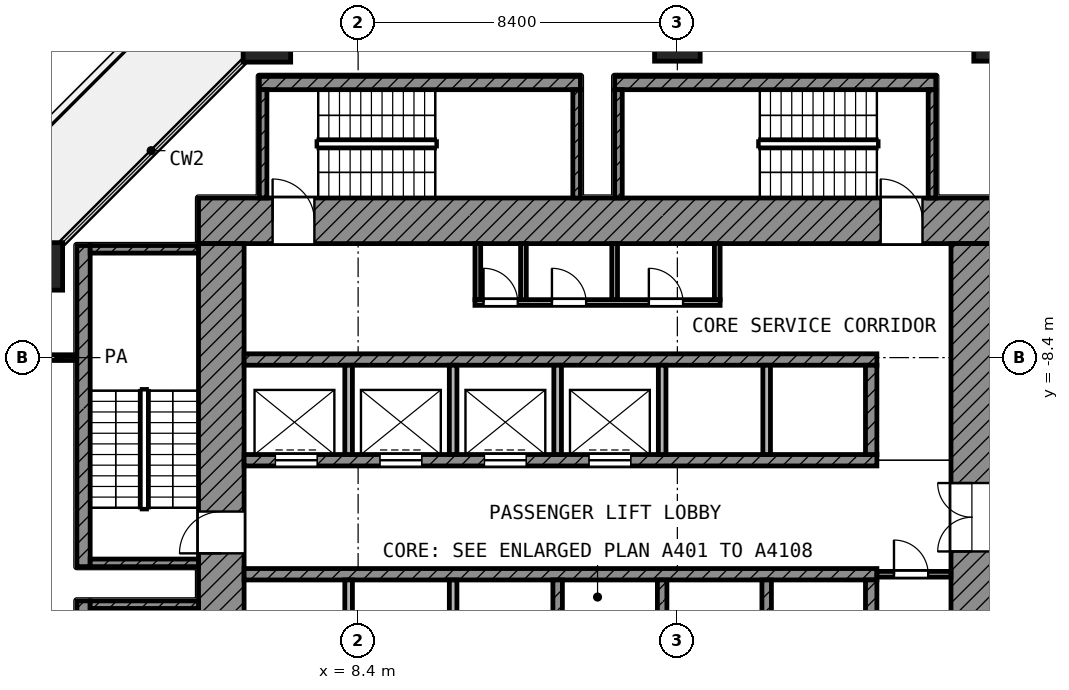
"""IFC4 building model, lengths in metres.
Left out: names, types, materials, properties, quantities, classifications, styles, units other than length and angle.
Written with IfcOpenShell. Run it as: python <this file> out.ifc"""

import sys

from ifc_helpers import new_model, si_unit, direction, frame, frame_2d, origin, origin_2d, place, context, subcontext, project, spatial, rectangle, extrude, element, fill, save


model = new_model("IFC4")
c1 = context("Model", 3, precision=1e-05, world=origin(), true_north=direction((0.0, 1.0)))
c2 = subcontext(c1, "Body", "Model", "MODEL_VIEW")
j1 = project(units=[si_unit("LENGTHUNIT", "METRE"), si_unit("PLANEANGLEUNIT", "RADIAN")], contexts=[c1])
p1 = place(None, origin())
s1 = spatial("IfcSite", under=j1, at=p1, CompositionType="ELEMENT")
p2 = place(p1, origin())
s2 = spatial("IfcBuilding", under=s1, at=p2, CompositionType="ELEMENT")
p3 = place(p2, frame((0.0, 0.0, 51.8)))
s3 = spatial("IfcBuildingStorey", under=s2, at=p3, CompositionType="ELEMENT", Elevation=51.8)
p4 = place(p3, frame((6.0, 0.0, 0.0), z_axis=(0.0, 0.0, 1.0), x_axis=(1.0, 0.0, 0.0)))
e1 = element("IfcColumn", 1, at=p4, inside=s3, PredefinedType="COLUMN", context=c2, shape_type="SweptSolid", body=[
    extrude(rectangle(XDim=1.25, YDim=1.25, at=origin_2d()), origin(), (0.0, 0.0, 1.0), 4.2),
])
for number, where, z_axis, x_axis in (
    (2, (16.8, 0.0, 0.0), (0.0, 0.0, 1.0), (1.0, 0.0, 0.0)),
    (3, (25.2, 0.0, 0.0), (0.0, 0.0, 1.0), (1.0, 0.0, 0.0)),
):
    element("IfcColumn", number, at=place(p3, frame(where, z_axis=z_axis, x_axis=x_axis)), inside=s3, PredefinedType="COLUMN", context=c2, shape_type="SweptSolid", body=[
        extrude(rectangle(XDim=1.2, YDim=1.2, at=origin_2d()), origin(), (0.0, 0.0, 1.0), 4.2),
    ])
p5 = place(p3, frame((0.0, -6.0, 0.0), z_axis=(0.0, 0.0, 1.0), x_axis=(1.0, 0.0, 0.0)))
e4 = element("IfcColumn", 4, at=p5, inside=s3, PredefinedType="COLUMN", context=c2, shape_type="SweptSolid", body=[
    extrude(rectangle(XDim=1.25, YDim=1.25, at=origin_2d()), origin(), (0.0, 0.0, 1.0), 4.2),
])
p6 = place(p3, frame((4.2, -4.8, 0.0), z_axis=(0.0, 0.0, 1.0), x_axis=(1.0, 0.0, 0.0)))
e5 = element("IfcWall", 5, at=p6, inside=s3, PredefinedType="SHEAR", context=c2, shape_type="SweptSolid", body=[
    extrude(rectangle(XDim=20.9, YDim=1.2, at=frame_2d((10.45, 0.0))), origin(), (0.0, 0.0, 1.0), 3.9),
])
p7 = place(p6, frame((1.95, 0.0, 0.0)))
e6 = element("IfcOpeningElement", 6, at=p7, cuts=e5, PredefinedType="OPENING", context=c2, shape_type="SweptSolid", body=[
    extrude(rectangle(XDim=1.1, YDim=2.1, at=frame_2d((0.55, 1.05))), frame((0.0, 0.61, 0.0), z_axis=(0.0, -1.0, 0.0), x_axis=(1.0, 0.0, 0.0)), (0.0, 0.0, 1.0), 1.22),
])
p8 = place(p6, frame((17.95, 0.0, 0.0)))
e7 = element("IfcOpeningElement", 7, at=p8, cuts=e5, PredefinedType="OPENING", context=c2, shape_type="SweptSolid", body=[
    extrude(rectangle(XDim=1.1, YDim=2.1, at=frame_2d((0.55, 1.05))), frame((0.0, 0.61, 0.0), z_axis=(0.0, -1.0, 0.0), x_axis=(1.0, 0.0, 0.0)), (0.0, 0.0, 1.0), 1.22),
])
p9 = place(p3, frame((4.8, -25.1, 0.0), z_axis=(0.0, 0.0, 1.0), x_axis=(0.0, 1.0, 0.0)))
e8 = element("IfcWall", 8, at=p9, inside=s3, PredefinedType="SHEAR", context=c2, shape_type="SweptSolid", body=[
    extrude(rectangle(XDim=19.7, YDim=1.2, at=frame_2d((9.85, 0.0))), origin(), (0.0, 0.0, 1.0), 3.9),
])
p10 = place(p9, frame((11.55, 0.0, 0.0)))
e9 = element("IfcOpeningElement", 9, at=p10, cuts=e8, PredefinedType="OPENING", context=c2, shape_type="SweptSolid", body=[
    extrude(rectangle(XDim=1.1, YDim=2.1, at=frame_2d((0.55, 1.05))), frame((0.0, 0.61, 0.0), z_axis=(0.0, -1.0, 0.0), x_axis=(1.0, 0.0, 0.0)), (0.0, 0.0, 1.0), 1.22),
])
p11 = place(p9, frame((2.25, 0.0, 0.0)))
e10 = element("IfcOpeningElement", 10, at=p11, cuts=e8, PredefinedType="OPENING", context=c2, shape_type="SweptSolid", body=[
    extrude(rectangle(XDim=1.1, YDim=2.1, at=frame_2d((0.55, 1.05))), frame((0.0, 0.61, 0.0), z_axis=(0.0, -1.0, 0.0), x_axis=(1.0, 0.0, 0.0)), (0.0, 0.0, 1.0), 1.22),
])
p12 = place(p3, frame((24.55, -24.0, 0.0), z_axis=(0.0, 0.0, 1.0), x_axis=(0.0, 1.0, 0.0)))
e11 = element("IfcWall", 11, at=p12, inside=s3, PredefinedType="SHEAR", context=c2, shape_type="SweptSolid", body=[
    extrude(rectangle(XDim=18.6, YDim=1.1, at=frame_2d((9.3, 0.0))), origin(), (0.0, 0.0, 1.0), 3.9),
])
p13 = place(p12, frame((10.5, 0.0, 0.0)))
e12 = element("IfcOpeningElement", 12, at=p13, cuts=e11, PredefinedType="OPENING", context=c2, shape_type="SweptSolid", body=[
    extrude(rectangle(XDim=1.8, YDim=2.1, at=frame_2d((0.9, 1.05))), frame((0.0, 0.56, 0.0), z_axis=(0.0, -1.0, 0.0), x_axis=(1.0, 0.0, 0.0)), (0.0, 0.0, 1.0), 1.12),
])
p14 = place(p3, frame((5.4, -8.45, 0.0), z_axis=(0.0, 0.0, 1.0), x_axis=(1.0, 0.0, 0.0)))
e13 = element("IfcWall", 13, at=p14, inside=s3, PredefinedType="SHEAR", context=c2, shape_type="SweptSolid", body=[
    extrude(rectangle(XDim=16.65, YDim=0.3, at=frame_2d((8.325, 0.0))), origin(), (0.0, 0.0, 1.0), 3.9),
])
p15 = place(p3, frame((5.4, -11.1, 0.0), z_axis=(0.0, 0.0, 1.0), x_axis=(1.0, 0.0, 0.0)))
e14 = element("IfcWall", 14, at=p15, inside=s3, PredefinedType="SHEAR", context=c2, shape_type="SweptSolid", body=[
    extrude(rectangle(XDim=16.65, YDim=0.3, at=frame_2d((8.325, 0.0))), origin(), (0.0, 0.0, 1.0), 3.9),
])
p16 = place(p15, frame((0.825, 0.0, 0.0)))
e15 = element("IfcOpeningElement", 15, at=p16, cuts=e14, PredefinedType="OPENING", context=c2, shape_type="SweptSolid", body=[
    extrude(rectangle(XDim=1.1, YDim=2.1, at=frame_2d((0.55, 1.05))), frame((0.0, 0.16, 0.0), z_axis=(0.0, -1.0, 0.0), x_axis=(1.0, 0.0, 0.0)), (0.0, 0.0, 1.0), 0.32),
])
p17 = place(p15, frame((3.575, 0.0, 0.0)))
e16 = element("IfcOpeningElement", 16, at=p17, cuts=e14, PredefinedType="OPENING", context=c2, shape_type="SweptSolid", body=[
    extrude(rectangle(XDim=1.1, YDim=2.1, at=frame_2d((0.55, 1.05))), frame((0.0, 0.16, 0.0), z_axis=(0.0, -1.0, 0.0), x_axis=(1.0, 0.0, 0.0)), (0.0, 0.0, 1.0), 0.32),
])
p18 = place(p15, frame((6.325, 0.0, 0.0)))
e17 = element("IfcOpeningElement", 17, at=p18, cuts=e14, PredefinedType="OPENING", context=c2, shape_type="SweptSolid", body=[
    extrude(rectangle(XDim=1.1, YDim=2.1, at=frame_2d((0.55, 1.05))), frame((0.0, 0.16, 0.0), z_axis=(0.0, -1.0, 0.0), x_axis=(1.0, 0.0, 0.0)), (0.0, 0.0, 1.0), 0.32),
])
p19 = place(p15, frame((9.075, 0.0, 0.0)))
e18 = element("IfcOpeningElement", 18, at=p19, cuts=e14, PredefinedType="OPENING", context=c2, shape_type="SweptSolid", body=[
    extrude(rectangle(XDim=1.1, YDim=2.1, at=frame_2d((0.55, 1.05))), frame((0.0, 0.16, 0.0), z_axis=(0.0, -1.0, 0.0), x_axis=(1.0, 0.0, 0.0)), (0.0, 0.0, 1.0), 0.32),
])
p20 = place(p3, frame((5.4, -14.1, 0.0), z_axis=(0.0, 0.0, 1.0), x_axis=(1.0, 0.0, 0.0)))
e19 = element("IfcWall", 19, at=p20, inside=s3, PredefinedType="SHEAR", context=c2, shape_type="SweptSolid", body=[
    extrude(rectangle(XDim=16.65, YDim=0.3, at=frame_2d((8.325, 0.0))), origin(), (0.0, 0.0, 1.0), 3.9),
])
p21 = place(p3, frame((21.9, -10.95, 0.0), z_axis=(0.0, 0.0, 1.0), x_axis=(0.0, 1.0, 0.0)))
e20 = element("IfcWall", 20, at=p21, inside=s3, PredefinedType="SHEAR", context=c2, shape_type="SweptSolid", body=[
    extrude(rectangle(XDim=2.35, YDim=0.3, at=frame_2d((1.175, 0.0))), origin(), (0.0, 0.0, 1.0), 3.9),
])
p22 = place(p3, frame((21.9, -16.6, 0.0), z_axis=(0.0, 0.0, 1.0), x_axis=(0.0, 1.0, 0.0)))
e21 = element("IfcWall", 21, at=p22, inside=s3, PredefinedType="SHEAR", context=c2, shape_type="SweptSolid", body=[
    extrude(rectangle(XDim=2.35, YDim=0.3, at=frame_2d((1.175, 0.0))), origin(), (0.0, 0.0, 1.0), 3.9),
])
for number, where, z_axis, x_axis in (
    (22, (8.15, -10.95, 0.0), (0.0, 0.0, 1.0), (0.0, 1.0, 0.0)),
    (23, (10.9, -10.95, 0.0), (0.0, 0.0, 1.0), (0.0, 1.0, 0.0)),
    (24, (13.65, -10.95, 0.0), (0.0, 0.0, 1.0), (0.0, 1.0, 0.0)),
    (25, (16.4, -10.95, 0.0), (0.0, 0.0, 1.0), (0.0, 1.0, 0.0)),
    (26, (19.15, -10.95, 0.0), (0.0, 0.0, 1.0), (0.0, 1.0, 0.0)),
):
    element("IfcWall", number, at=place(p3, frame(where, z_axis=z_axis, x_axis=x_axis)), inside=s3, PredefinedType="PARTITIONING", context=c2, shape_type="SweptSolid", body=[
        extrude(rectangle(XDim=2.35, YDim=0.2, at=frame_2d((1.175, 0.0))), origin(), (0.0, 0.0, 1.0), 3.9),
    ])
for number, where, z_axis, x_axis in (
    (27, (8.15, -16.6, 0.0), (0.0, 0.0, 1.0), (0.0, 1.0, 0.0)),
    (28, (10.9, -16.6, 0.0), (0.0, 0.0, 1.0), (0.0, 1.0, 0.0)),
):
    element("IfcWall", number, at=place(p3, frame(where, z_axis=z_axis, x_axis=x_axis)), inside=s3, PredefinedType="PARTITIONING", context=c2, shape_type="SweptSolid", body=[
        extrude(rectangle(XDim=2.35, YDim=0.2, at=frame_2d((1.175, 0.0))), origin(), (0.0, 0.0, 1.0), 3.9),
    ])
for number, where, z_axis, x_axis in (
    (29, (13.65, -16.6, 0.0), (0.0, 0.0, 1.0), (0.0, 1.0, 0.0)),
    (30, (16.4, -16.6, 0.0), (0.0, 0.0, 1.0), (0.0, 1.0, 0.0)),
    (31, (19.15, -16.6, 0.0), (0.0, 0.0, 1.0), (0.0, 1.0, 0.0)),
):
    element("IfcWall", number, at=place(p3, frame(where, z_axis=z_axis, x_axis=x_axis)), inside=s3, PredefinedType="SHEAR", context=c2, shape_type="SweptSolid", body=[
        extrude(rectangle(XDim=2.35, YDim=0.25, at=frame_2d((1.175, 0.0))), origin(), (0.0, 0.0, 1.0), 3.9),
    ])
p23 = place(p3, frame((22.05, -14.1, 0.0), z_axis=(0.0, 0.0, 1.0), x_axis=(1.0, 0.0, 0.0)))
e32 = element("IfcWall", 32, at=p23, inside=s3, PredefinedType="PARTITIONING", context=c2, shape_type="SweptSolid", body=[
    extrude(rectangle(XDim=1.95, YDim=0.15, at=frame_2d((0.975, 0.0))), origin(), (0.0, 0.0, 1.0), 3.9),
])
p24 = place(p23, frame((0.45, 0.0, 0.0)))
e33 = element("IfcOpeningElement", 33, at=p24, cuts=e32, PredefinedType="OPENING", context=c2, shape_type="SweptSolid", body=[
    extrude(rectangle(XDim=0.9, YDim=2.1, at=frame_2d((0.45, 1.05))), frame((0.0, 0.085, 0.0), z_axis=(0.0, -1.0, 0.0), x_axis=(1.0, 0.0, 0.0)), (0.0, 0.0, 1.0), 0.17),
])
p25 = place(p3, frame((11.475, -6.95, 0.0), z_axis=(0.0, 0.0, 1.0), x_axis=(1.0, 0.0, 0.0)))
e34 = element("IfcWall", 34, at=p25, inside=s3, PredefinedType="PARTITIONING", context=c2, shape_type="SweptSolid", body=[
    extrude(rectangle(XDim=6.45, YDim=0.15, at=frame_2d((3.225, 0.0))), origin(), (0.0, 0.0, 1.0), 3.9),
])
p26 = place(p25, frame((0.225, 0.0, 0.0)))
e35 = element("IfcOpeningElement", 35, at=p26, cuts=e34, PredefinedType="OPENING", context=c2, shape_type="SweptSolid", body=[
    extrude(rectangle(XDim=0.9, YDim=2.1, at=frame_2d((0.45, 1.05))), frame((0.0, 0.085, 0.0), z_axis=(0.0, -1.0, 0.0), x_axis=(1.0, 0.0, 0.0)), (0.0, 0.0, 1.0), 0.17),
])
p27 = place(p25, frame((2.025, 0.0, 0.0)))
e36 = element("IfcOpeningElement", 36, at=p27, cuts=e34, PredefinedType="OPENING", context=c2, shape_type="SweptSolid", body=[
    extrude(rectangle(XDim=0.9, YDim=2.1, at=frame_2d((0.45, 1.05))), frame((0.0, 0.085, 0.0), z_axis=(0.0, -1.0, 0.0), x_axis=(1.0, 0.0, 0.0)), (0.0, 0.0, 1.0), 0.17),
])
p28 = place(p25, frame((4.575, 0.0, 0.0)))
e37 = element("IfcOpeningElement", 37, at=p28, cuts=e34, PredefinedType="OPENING", context=c2, shape_type="SweptSolid", body=[
    extrude(rectangle(XDim=0.9, YDim=2.1, at=frame_2d((0.45, 1.05))), frame((0.0, 0.085, 0.0), z_axis=(0.0, -1.0, 0.0), x_axis=(1.0, 0.0, 0.0)), (0.0, 0.0, 1.0), 0.17),
])
for number, where, z_axis, x_axis in (
    (38, (11.55, -6.875, 0.0), (0.0, 0.0, 1.0), (0.0, 1.0, 0.0)),
    (39, (12.75, -6.875, 0.0), (0.0, 0.0, 1.0), (0.0, 1.0, 0.0)),
    (40, (15.15, -6.875, 0.0), (0.0, 0.0, 1.0), (0.0, 1.0, 0.0)),
    (41, (17.85, -6.875, 0.0), (0.0, 0.0, 1.0), (0.0, 1.0, 0.0)),
):
    element("IfcWall", number, at=place(p3, frame(where, z_axis=z_axis, x_axis=x_axis)), inside=s3, PredefinedType="PARTITIONING", context=c2, shape_type="SweptSolid", body=[
        extrude(rectangle(XDim=1.475, YDim=0.15, at=frame_2d((0.738, 0.0))), origin(), (0.0, 0.0, 1.0), 3.9),
    ])
p29 = place(p3, frame((1.175, -13.9, 0.0), z_axis=(0.0, 0.0, 1.0), x_axis=(0.0, 1.0, 0.0)))
e42 = element("IfcWall", 42, at=p29, inside=s3, PredefinedType="SHEAR", context=c2, shape_type="SweptSolid", body=[
    extrude(rectangle(XDim=8.45, YDim=0.35, at=frame_2d((4.225, 0.0))), origin(), (0.0, 0.0, 1.0), 3.9),
])
for number, where, z_axis, x_axis in (
    (43, (1.35, -5.55, 0.0), (0.0, 0.0, 1.0), (1.0, 0.0, 0.0)),
    (44, (1.35, -13.8, 0.0), (0.0, 0.0, 1.0), (1.0, 0.0, 0.0)),
):
    element("IfcWall", number, at=place(p3, frame(where, z_axis=z_axis, x_axis=x_axis)), inside=s3, PredefinedType="SHEAR", context=c2, shape_type="SweptSolid", body=[
        extrude(rectangle(XDim=2.85, YDim=0.2, at=frame_2d((1.425, 0.0))), origin(), (0.0, 0.0, 1.0), 3.9),
    ])
p30 = place(p3, frame((1.175, -23.25, 0.0), z_axis=(0.0, 0.0, 1.0), x_axis=(0.0, 1.0, 0.0)))
e45 = element("IfcWall", 45, at=p30, inside=s3, PredefinedType="SHEAR", context=c2, shape_type="SweptSolid", body=[
    extrude(rectangle(XDim=8.45, YDim=0.35, at=frame_2d((4.225, 0.0))), origin(), (0.0, 0.0, 1.0), 3.9),
])
p31 = place(p3, frame((1.35, -14.9, 0.0), z_axis=(0.0, 0.0, 1.0), x_axis=(1.0, 0.0, 0.0)))
e46 = element("IfcWall", 46, at=p31, inside=s3, PredefinedType="SHEAR", context=c2, shape_type="SweptSolid", body=[
    extrude(rectangle(XDim=2.85, YDim=0.2, at=frame_2d((1.425, 0.0))), origin(), (0.0, 0.0, 1.0), 3.9),
])
p32 = place(p3, frame((5.8, -1.175, 0.0), z_axis=(0.0, 0.0, 1.0), x_axis=(1.0, 0.0, 0.0)))
e47 = element("IfcWall", 47, at=p32, inside=s3, PredefinedType="SHEAR", context=c2, shape_type="SweptSolid", body=[
    extrude(rectangle(XDim=8.45, YDim=0.35, at=frame_2d((4.225, 0.0))), origin(), (0.0, 0.0, 1.0), 3.9),
])
for number, where, z_axis, x_axis in (
    (48, (5.9, -4.2, 0.0), (0.0, 0.0, 1.0), (0.0, 1.0, 0.0)),
    (49, (14.15, -4.2, 0.0), (0.0, 0.0, 1.0), (0.0, 1.0, 0.0)),
):
    element("IfcWall", number, at=place(p3, frame(where, z_axis=z_axis, x_axis=x_axis)), inside=s3, PredefinedType="SHEAR", context=c2, shape_type="SweptSolid", body=[
        extrude(rectangle(XDim=2.85, YDim=0.2, at=frame_2d((1.425, 0.0))), origin(), (0.0, 0.0, 1.0), 3.9),
    ])
p33 = place(p3, frame((15.15, -1.175, 0.0), z_axis=(0.0, 0.0, 1.0), x_axis=(1.0, 0.0, 0.0)))
e50 = element("IfcWall", 50, at=p33, inside=s3, PredefinedType="SHEAR", context=c2, shape_type="SweptSolid", body=[
    extrude(rectangle(XDim=8.45, YDim=0.35, at=frame_2d((4.225, 0.0))), origin(), (0.0, 0.0, 1.0), 3.9),
])
for number, where, z_axis, x_axis in (
    (51, (15.25, -4.2, 0.0), (0.0, 0.0, 1.0), (0.0, 1.0, 0.0)),
    (52, (23.5, -4.2, 0.0), (0.0, 0.0, 1.0), (0.0, 1.0, 0.0)),
):
    element("IfcWall", number, at=place(p3, frame(where, z_axis=z_axis, x_axis=x_axis)), inside=s3, PredefinedType="SHEAR", context=c2, shape_type="SweptSolid", body=[
        extrude(rectangle(XDim=2.85, YDim=0.2, at=frame_2d((1.425, 0.0))), origin(), (0.0, 0.0, 1.0), 3.9),
    ])
p34 = place(p3, frame((0.08, -8.4, 0.0), z_axis=(0.0, 0.0, 1.0), x_axis=(1.0, 0.0, 0.0)))
e53 = element("IfcWall", 53, at=p34, inside=s3, PredefinedType="PARTITIONING", context=c2, shape_type="SweptSolid", body=[
    extrude(rectangle(XDim=0.89, YDim=0.15, at=frame_2d((0.445, 0.0))), origin(), (0.0, 0.0, 1.0), 3.9),
])
p35 = place(p16, origin())
e54 = element("IfcDoor", 54, at=p35, inside=s3, OperationType="DOUBLE_DOOR_SLIDING", PredefinedType="DOOR", context=c2, shape_type="SweptSolid", body=[
    extrude(rectangle(XDim=1.1, YDim=2.1, at=frame_2d((0.55, 1.05))), frame((0.0, 0.025, 0.0), z_axis=(0.0, -1.0, 0.0), x_axis=(1.0, 0.0, 0.0)), (0.0, 0.0, 1.0), 0.05),
])
fill(e15, e54)
p36 = place(p17, origin())
e55 = element("IfcDoor", 55, at=p36, inside=s3, OperationType="DOUBLE_DOOR_SLIDING", PredefinedType="DOOR", context=c2, shape_type="SweptSolid", body=[
    extrude(rectangle(XDim=1.1, YDim=2.1, at=frame_2d((0.55, 1.05))), frame((0.0, 0.025, 0.0), z_axis=(0.0, -1.0, 0.0), x_axis=(1.0, 0.0, 0.0)), (0.0, 0.0, 1.0), 0.05),
])
fill(e16, e55)
p37 = place(p18, origin())
e56 = element("IfcDoor", 56, at=p37, inside=s3, OperationType="DOUBLE_DOOR_SLIDING", PredefinedType="DOOR", context=c2, shape_type="SweptSolid", body=[
    extrude(rectangle(XDim=1.1, YDim=2.1, at=frame_2d((0.55, 1.05))), frame((0.0, 0.025, 0.0), z_axis=(0.0, -1.0, 0.0), x_axis=(1.0, 0.0, 0.0)), (0.0, 0.0, 1.0), 0.05),
])
fill(e17, e56)
p38 = place(p19, origin())
e57 = element("IfcDoor", 57, at=p38, inside=s3, OperationType="DOUBLE_DOOR_SLIDING", PredefinedType="DOOR", context=c2, shape_type="SweptSolid", body=[
    extrude(rectangle(XDim=1.1, YDim=2.1, at=frame_2d((0.55, 1.05))), frame((0.0, 0.025, 0.0), z_axis=(0.0, -1.0, 0.0), x_axis=(1.0, 0.0, 0.0)), (0.0, 0.0, 1.0), 0.05),
])
fill(e18, e57)
p39 = place(p10, origin())
e58 = element("IfcDoor", 58, at=p39, inside=s3, OperationType="SINGLE_SWING_LEFT", PredefinedType="DOOR", context=c2, shape_type="SweptSolid", body=[
    extrude(rectangle(XDim=1.1, YDim=2.1, at=frame_2d((0.55, 1.05))), frame((0.0, 0.025, 0.0), z_axis=(0.0, -1.0, 0.0), x_axis=(1.0, 0.0, 0.0)), (0.0, 0.0, 1.0), 0.05),
])
fill(e9, e58)
p40 = place(p7, origin())
e59 = element("IfcDoor", 59, at=p40, inside=s3, OperationType="SINGLE_SWING_LEFT", PredefinedType="DOOR", context=c2, shape_type="SweptSolid", body=[
    extrude(rectangle(XDim=1.1, YDim=2.1, at=frame_2d((0.55, 1.05))), frame((0.0, 0.025, 0.0), z_axis=(0.0, -1.0, 0.0), x_axis=(1.0, 0.0, 0.0)), (0.0, 0.0, 1.0), 0.05),
])
fill(e6, e59)
p41 = place(p8, origin())
e60 = element("IfcDoor", 60, at=p41, inside=s3, OperationType="SINGLE_SWING_LEFT", PredefinedType="DOOR", context=c2, shape_type="SweptSolid", body=[
    extrude(rectangle(XDim=1.1, YDim=2.1, at=frame_2d((0.55, 1.05))), frame((0.0, 0.025, 0.0), z_axis=(0.0, -1.0, 0.0), x_axis=(1.0, 0.0, 0.0)), (0.0, 0.0, 1.0), 0.05),
])
fill(e7, e60)
p42 = place(p13, origin())
e61 = element("IfcDoor", 61, at=p42, inside=s3, OperationType="DOUBLE_DOOR_SINGLE_SWING", PredefinedType="DOOR", context=c2, shape_type="SweptSolid", body=[
    extrude(rectangle(XDim=1.8, YDim=2.1, at=frame_2d((0.9, 1.05))), frame((0.0, 0.025, 0.0), z_axis=(0.0, -1.0, 0.0), x_axis=(1.0, 0.0, 0.0)), (0.0, 0.0, 1.0), 0.05),
])
fill(e12, e61)
p43 = place(p26, origin())
e62 = element("IfcDoor", 62, at=p43, inside=s3, OperationType="SINGLE_SWING_LEFT", PredefinedType="DOOR", context=c2, shape_type="SweptSolid", body=[
    extrude(rectangle(XDim=0.9, YDim=2.1, at=frame_2d((0.45, 1.05))), frame((0.0, 0.025, 0.0), z_axis=(0.0, -1.0, 0.0), x_axis=(1.0, 0.0, 0.0)), (0.0, 0.0, 1.0), 0.05),
])
fill(e35, e62)
p44 = place(p27, origin())
e63 = element("IfcDoor", 63, at=p44, inside=s3, OperationType="SINGLE_SWING_LEFT", PredefinedType="DOOR", context=c2, shape_type="SweptSolid", body=[
    extrude(rectangle(XDim=0.9, YDim=2.1, at=frame_2d((0.45, 1.05))), frame((0.0, 0.025, 0.0), z_axis=(0.0, -1.0, 0.0), x_axis=(1.0, 0.0, 0.0)), (0.0, 0.0, 1.0), 0.05),
])
fill(e36, e63)
p45 = place(p28, origin())
e64 = element("IfcDoor", 64, at=p45, inside=s3, OperationType="SINGLE_SWING_LEFT", PredefinedType="DOOR", context=c2, shape_type="SweptSolid", body=[
    extrude(rectangle(XDim=0.9, YDim=2.1, at=frame_2d((0.45, 1.05))), frame((0.0, 0.025, 0.0), z_axis=(0.0, -1.0, 0.0), x_axis=(1.0, 0.0, 0.0)), (0.0, 0.0, 1.0), 0.05),
])
fill(e37, e64)
p46 = place(p24, origin())
e65 = element("IfcDoor", 65, at=p46, inside=s3, OperationType="SINGLE_SWING_LEFT", PredefinedType="DOOR", context=c2, shape_type="SweptSolid", body=[
    extrude(rectangle(XDim=0.9, YDim=2.1, at=frame_2d((0.45, 1.05))), frame((0.0, 0.025, 0.0), z_axis=(0.0, -1.0, 0.0), x_axis=(1.0, 0.0, 0.0)), (0.0, 0.0, 1.0), 0.05),
])
fill(e33, e65)
save(model, sys.argv[1])
